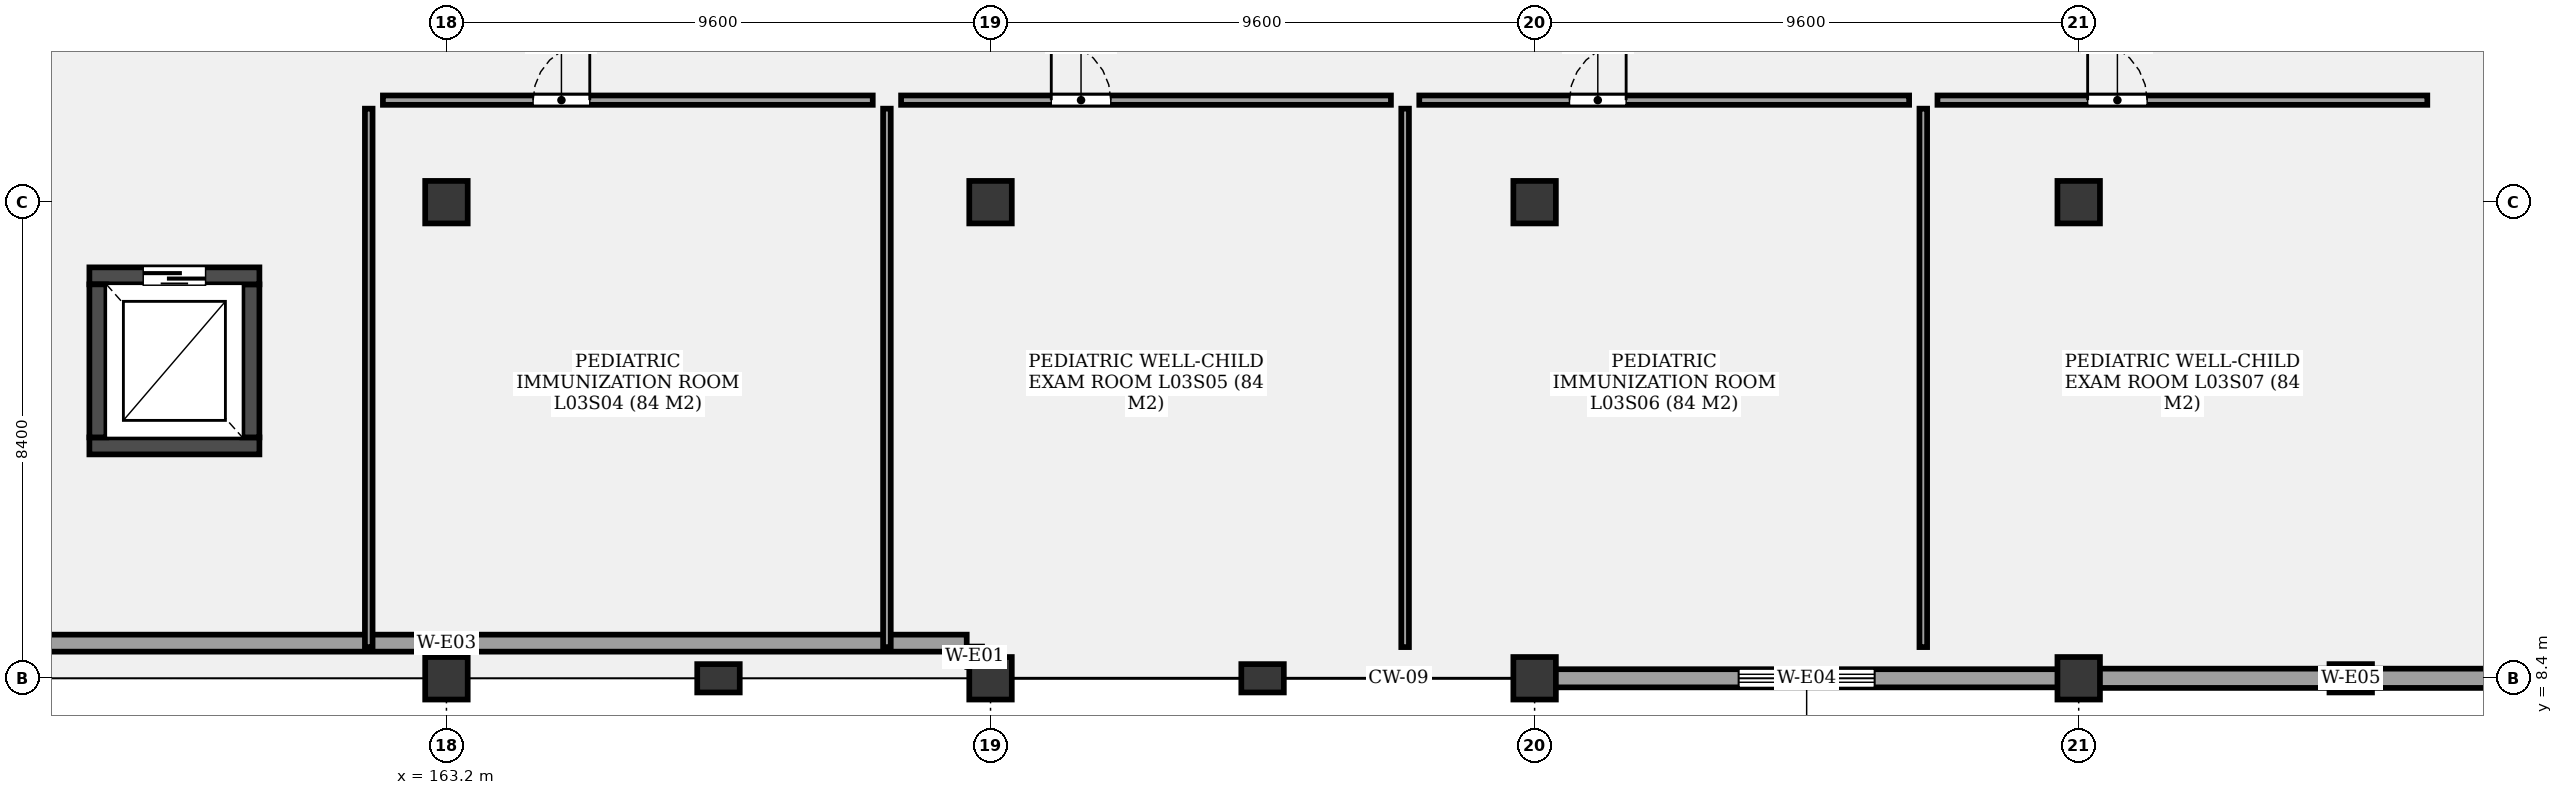
"""IFC4 building model, lengths in metres.
Left out: names, types, materials, properties, quantities, classifications, styles, units other than length and angle.
Written with IfcOpenShell. Run it as: python <this file> out.ifc"""

import sys

from ifc_helpers import new_model, si_unit, direction, frame, frame_2d, origin, origin_2d, place, context, subcontext, project, spatial, rectangle, extrude, element, fill, save


model = new_model("IFC4")
c1 = context("Model", 3, precision=1e-05, world=origin(), true_north=direction((0.0, 1.0)))
c2 = subcontext(c1, "Body", "Model", "MODEL_VIEW")
j1 = project(units=[si_unit("LENGTHUNIT", "METRE"), si_unit("PLANEANGLEUNIT", "RADIAN")], contexts=[c1])
p1 = place(None, origin())
s1 = spatial("IfcSite", under=j1, at=p1, CompositionType="ELEMENT")
p2 = place(p1, origin())
s2 = spatial("IfcBuilding", under=s1, at=p2, CompositionType="ELEMENT")
p3 = place(p2, frame((0.0, 0.0, 13.5)))
s3 = spatial("IfcBuildingStorey", under=s2, at=p3, CompositionType="ELEMENT", Elevation=13.5)
for number, where, z_axis, x_axis in (
    (1, (163.2, 8.4, 0.0), (0.0, 0.0, 1.0), (1.0, 0.0, 0.0)),
    (2, (163.2, 16.8, 0.0), (0.0, 0.0, 1.0), (1.0, 0.0, 0.0)),
    (3, (172.8, 8.4, 0.0), (0.0, 0.0, 1.0), (1.0, 0.0, 0.0)),
    (4, (172.8, 16.8, 0.0), (0.0, 0.0, 1.0), (1.0, 0.0, 0.0)),
    (5, (182.4, 8.4, 0.0), (0.0, 0.0, 1.0), (1.0, 0.0, 0.0)),
    (6, (182.4, 16.8, 0.0), (0.0, 0.0, 1.0), (1.0, 0.0, 0.0)),
    (7, (192.0, 8.4, 0.0), (0.0, 0.0, 1.0), (1.0, 0.0, 0.0)),
    (8, (192.0, 16.8, 0.0), (0.0, 0.0, 1.0), (1.0, 0.0, 0.0)),
):
    element("IfcColumn", number, at=place(p3, frame(where, z_axis=z_axis, x_axis=x_axis)), inside=s3, PredefinedType="COLUMN", context=c2, shape_type="SweptSolid", body=[
        extrude(rectangle(XDim=0.75, YDim=0.75, at=origin_2d()), origin(), (0.0, 0.0, 1.0), 4.3),
    ])
for number, where, z_axis, x_axis in (
    (9, (168.0, 8.4, 0.0), (0.0, 0.0, 1.0), (1.0, 0.0, 0.0)),
    (10, (177.6, 8.4, 0.0), (0.0, 0.0, 1.0), (1.0, 0.0, 0.0)),
    (11, (196.8, 8.4, 0.0), (0.0, 0.0, 1.0), (1.0, 0.0, 0.0)),
):
    element("IfcColumn", number, at=place(p3, frame(where, z_axis=z_axis, x_axis=x_axis)), inside=s3, PredefinedType="PILASTER", context=c2, shape_type="SweptSolid", body=[
        extrude(rectangle(XDim=0.75, YDim=0.5, at=origin_2d()), origin(), (0.0, 0.0, 1.0), 4.3),
    ])
p4 = place(p3, frame((156.9, 12.5, 0.0), z_axis=(0.0, 0.0, 1.0), x_axis=(1.0, 0.0, 0.0)))
e12 = element("IfcWall", 12, at=p4, inside=s3, PredefinedType="SHEAR", context=c2, shape_type="SweptSolid", body=[
    extrude(rectangle(XDim=3.0, YDim=0.3, at=frame_2d((1.5, 0.0))), origin(), (0.0, 0.0, 1.0), 4.3),
])
p5 = place(p3, frame((159.75, 12.65, 0.0), z_axis=(0.0, 0.0, 1.0), x_axis=(0.0, 1.0, 0.0)))
e13 = element("IfcWall", 13, at=p5, inside=s3, PredefinedType="SHEAR", context=c2, shape_type="SweptSolid", body=[
    extrude(rectangle(XDim=2.7, YDim=0.3, at=frame_2d((1.35, 0.0))), origin(), (0.0, 0.0, 1.0), 4.3),
])
p6 = place(p3, frame((159.9, 15.5, 0.0), z_axis=(0.0, 0.0, 1.0), x_axis=(-1.0, 0.0, 0.0)))
e14 = element("IfcWall", 14, at=p6, inside=s3, PredefinedType="SHEAR", context=c2, shape_type="SweptSolid", body=[
    extrude(rectangle(XDim=3.0, YDim=0.3, at=frame_2d((1.5, 0.0))), origin(), (0.0, 0.0, 1.0), 4.3),
])
p7 = place(p6, frame((0.95, 0.0, 0.0)))
e15 = element("IfcOpeningElement", 15, at=p7, cuts=e14, PredefinedType="OPENING", context=c2, shape_type="SweptSolid", body=[
    extrude(rectangle(XDim=1.1, YDim=2.2, at=frame_2d((0.55, 1.1))), frame((0.0, 0.16, 0.0), z_axis=(0.0, -1.0, 0.0), x_axis=(1.0, 0.0, 0.0)), (0.0, 0.0, 1.0), 0.32),
])
p8 = place(p3, frame((157.05, 15.35, 0.0), z_axis=(0.0, 0.0, 1.0), x_axis=(0.0, -1.0, 0.0)))
e16 = element("IfcWall", 16, at=p8, inside=s3, PredefinedType="SHEAR", context=c2, shape_type="SweptSolid", body=[
    extrude(rectangle(XDim=2.7, YDim=0.3, at=frame_2d((1.35, 0.0))), origin(), (0.0, 0.0, 1.0), 4.3),
])
p9 = place(p3, frame((172.52, 8.6, 0.0), z_axis=(0.0, 0.0, 1.0), x_axis=(0.0, 1.0, 0.0)))
e17 = element("IfcWall", 17, at=p9, inside=s3, PredefinedType="SOLIDWALL", context=c2, shape_type="SweptSolid", body=[
    extrude(rectangle(XDim=0.36, YDim=0.26, at=frame_2d((0.18, 0.0))), origin(), (0.0, 0.0, 1.0), 3.49),
])
p10 = place(p3, frame((172.38, 9.02, 0.0), z_axis=(0.0, 0.0, 1.0), x_axis=(-1.0, 0.0, 0.0)))
e18 = element("IfcWall", 18, at=p10, inside=s3, PredefinedType="SOLIDWALL", context=c2, shape_type="SweptSolid", body=[
    extrude(rectangle(XDim=18.36, YDim=0.3, at=frame_2d((9.18, 0.0))), origin(), (0.0, 0.0, 1.0), 3.49),
])
p11 = place(p3, frame((192.0, 8.4, 0.0), z_axis=(0.0, 0.0, 1.0), x_axis=(-1.0, 0.0, 0.0)))
e19 = element("IfcWall", 19, at=p11, inside=s3, PredefinedType="SOLIDWALL", context=c2, shape_type="SweptSolid", body=[
    extrude(rectangle(XDim=9.6, YDim=0.32, at=frame_2d((4.8, 0.0))), origin(), (0.0, 0.0, 1.0), 3.49),
])
p12 = place(p11, frame((3.6, 0.0, 0.85)))
e20 = element("IfcOpeningElement", 20, at=p12, cuts=e19, PredefinedType="OPENING", context=c2, shape_type="SweptSolid", body=[
    extrude(rectangle(XDim=2.4, YDim=1.4, at=frame_2d((1.2, 0.7))), frame((0.0, 0.17, 0.0), z_axis=(0.0, -1.0, 0.0), x_axis=(1.0, 0.0, 0.0)), (0.0, 0.0, 1.0), 0.34),
])
p13 = place(p3, frame((201.6, 8.4, 0.0), z_axis=(0.0, 0.0, 1.0), x_axis=(-1.0, 0.0, 0.0)))
e21 = element("IfcWall", 21, at=p13, inside=s3, PredefinedType="SOLIDWALL", context=c2, shape_type="SweptSolid", body=[
    extrude(rectangle(XDim=9.6, YDim=0.34, at=frame_2d((4.8, 0.0))), origin(), (0.0, 0.0, 1.0), 3.49),
])
p14 = place(p3, frame((162.079, 18.6, 0.0), z_axis=(0.0, 0.0, 1.0), x_axis=(1.0, 0.0, 0.0)))
e22 = element("IfcWall", 22, at=p14, inside=s3, PredefinedType="PARTITIONING", context=c2, shape_type="SweptSolid", body=[
    extrude(rectangle(XDim=8.643, YDim=0.165, at=frame_2d((4.321, 0.0))), origin(), (0.0, 0.0, 1.0), 3.4),
])
p15 = place(p14, frame((2.65, 0.0, 0.0)))
e23 = element("IfcOpeningElement", 23, at=p15, cuts=e22, PredefinedType="OPENING", context=c2, shape_type="SweptSolid", body=[
    extrude(rectangle(XDim=1.0, YDim=2.1, at=frame_2d((0.5, 1.05))), frame((0.0, 0.093, 0.0), z_axis=(0.0, -1.0, 0.0), x_axis=(1.0, 0.0, 0.0)), (0.0, 0.0, 1.0), 0.185),
])
p16 = place(p3, frame((161.829, 8.95, 0.0), z_axis=(0.0, 0.0, 1.0), x_axis=(0.0, 1.0, 0.0)))
e24 = element("IfcWall", 24, at=p16, inside=s3, PredefinedType="PARTITIONING", context=c2, shape_type="SweptSolid", body=[
    extrude(rectangle(XDim=9.5, YDim=0.135, at=frame_2d((4.75, 0.0))), origin(), (0.0, 0.0, 1.0), 3.4),
])
p17 = place(p3, frame((171.222, 18.6, 0.0), z_axis=(0.0, 0.0, 1.0), x_axis=(1.0, 0.0, 0.0)))
e25 = element("IfcWall", 25, at=p17, inside=s3, PredefinedType="PARTITIONING", context=c2, shape_type="SweptSolid", body=[
    extrude(rectangle(XDim=8.643, YDim=0.165, at=frame_2d((4.322, 0.0))), origin(), (0.0, 0.0, 1.0), 3.4),
])
p18 = place(p17, frame((2.65, 0.0, 0.0)))
e26 = element("IfcOpeningElement", 26, at=p18, cuts=e25, PredefinedType="OPENING", context=c2, shape_type="SweptSolid", body=[
    extrude(rectangle(XDim=1.05, YDim=2.1, at=frame_2d((0.525, 1.05))), frame((0.0, 0.093, 0.0), z_axis=(0.0, -1.0, 0.0), x_axis=(1.0, 0.0, 0.0)), (0.0, 0.0, 1.0), 0.185),
])
p19 = place(p3, frame((170.972, 8.95, 0.0), z_axis=(0.0, 0.0, 1.0), x_axis=(0.0, 1.0, 0.0)))
e27 = element("IfcWall", 27, at=p19, inside=s3, PredefinedType="PARTITIONING", context=c2, shape_type="SweptSolid", body=[
    extrude(rectangle(XDim=9.5, YDim=0.135, at=frame_2d((4.75, 0.0))), origin(), (0.0, 0.0, 1.0), 3.4),
])
p20 = place(p3, frame((180.365, 18.6, 0.0), z_axis=(0.0, 0.0, 1.0), x_axis=(1.0, 0.0, 0.0)))
e28 = element("IfcWall", 28, at=p20, inside=s3, PredefinedType="PARTITIONING", context=c2, shape_type="SweptSolid", body=[
    extrude(rectangle(XDim=8.643, YDim=0.165, at=frame_2d((4.322, 0.0))), origin(), (0.0, 0.0, 1.0), 3.4),
])
p21 = place(p20, frame((2.65, 0.0, 0.0)))
e29 = element("IfcOpeningElement", 29, at=p21, cuts=e28, PredefinedType="OPENING", context=c2, shape_type="SweptSolid", body=[
    extrude(rectangle(XDim=1.0, YDim=2.1, at=frame_2d((0.5, 1.05))), frame((0.0, 0.093, 0.0), z_axis=(0.0, -1.0, 0.0), x_axis=(1.0, 0.0, 0.0)), (0.0, 0.0, 1.0), 0.185),
])
p22 = place(p3, frame((180.115, 8.95, 0.0), z_axis=(0.0, 0.0, 1.0), x_axis=(0.0, 1.0, 0.0)))
e30 = element("IfcWall", 30, at=p22, inside=s3, PredefinedType="PARTITIONING", context=c2, shape_type="SweptSolid", body=[
    extrude(rectangle(XDim=9.5, YDim=0.135, at=frame_2d((4.75, 0.0))), origin(), (0.0, 0.0, 1.0), 3.4),
])
p23 = place(p3, frame((189.508, 18.6, 0.0), z_axis=(0.0, 0.0, 1.0), x_axis=(1.0, 0.0, 0.0)))
e31 = element("IfcWall", 31, at=p23, inside=s3, PredefinedType="PARTITIONING", context=c2, shape_type="SweptSolid", body=[
    extrude(rectangle(XDim=8.643, YDim=0.165, at=frame_2d((4.321, 0.0))), origin(), (0.0, 0.0, 1.0), 3.4),
])
p24 = place(p23, frame((2.65, 0.0, 0.0)))
e32 = element("IfcOpeningElement", 32, at=p24, cuts=e31, PredefinedType="OPENING", context=c2, shape_type="SweptSolid", body=[
    extrude(rectangle(XDim=1.05, YDim=2.1, at=frame_2d((0.525, 1.05))), frame((0.0, 0.093, 0.0), z_axis=(0.0, -1.0, 0.0), x_axis=(1.0, 0.0, 0.0)), (0.0, 0.0, 1.0), 0.185),
])
p25 = place(p3, frame((189.258, 8.95, 0.0), z_axis=(0.0, 0.0, 1.0), x_axis=(0.0, 1.0, 0.0)))
e33 = element("IfcWall", 33, at=p25, inside=s3, PredefinedType="PARTITIONING", context=c2, shape_type="SweptSolid", body=[
    extrude(rectangle(XDim=9.5, YDim=0.135, at=frame_2d((4.75, 0.0))), origin(), (0.0, 0.0, 1.0), 3.4),
])
p26 = place(p7, origin())
e34 = element("IfcDoor", 34, at=p26, inside=s3, OperationType="SLIDING_TO_LEFT", PredefinedType="DOOR", context=c2, shape_type="SweptSolid", body=[
    extrude(rectangle(XDim=1.1, YDim=2.2, at=frame_2d((0.55, 1.1))), frame((0.0, 0.025, 0.0), z_axis=(0.0, -1.0, 0.0), x_axis=(1.0, 0.0, 0.0)), (0.0, 0.0, 1.0), 0.05),
])
fill(e15, e34)
p27 = place(p12, origin())
e35 = element("IfcWindow", 35, at=p27, inside=s3, PartitioningType="SINGLE_PANEL", PredefinedType="WINDOW", context=c2, shape_type="SweptSolid", body=[
    extrude(rectangle(XDim=2.4, YDim=1.4, at=frame_2d((1.2, 0.7))), frame((0.0, 0.03, 0.0), z_axis=(0.0, -1.0, 0.0), x_axis=(1.0, 0.0, 0.0)), (0.0, 0.0, 1.0), 0.06),
])
fill(e20, e35)
p28 = place(p15, origin())
e36 = element("IfcDoor", 36, at=p28, inside=s3, OperationType="SINGLE_SWING_RIGHT", PredefinedType="DOOR", context=c2, shape_type="SweptSolid", body=[
    extrude(rectangle(XDim=1.0, YDim=2.1, at=frame_2d((0.5, 1.05))), frame((0.0, 0.025, 0.0), z_axis=(0.0, -1.0, 0.0), x_axis=(1.0, 0.0, 0.0)), (0.0, 0.0, 1.0), 0.05),
])
fill(e23, e36)
p29 = place(p18, origin())
e37 = element("IfcDoor", 37, at=p29, inside=s3, OperationType="SINGLE_SWING_LEFT", PredefinedType="DOOR", context=c2, shape_type="SweptSolid", body=[
    extrude(rectangle(XDim=1.05, YDim=2.1, at=frame_2d((0.525, 1.05))), frame((0.0, 0.025, 0.0), z_axis=(0.0, -1.0, 0.0), x_axis=(1.0, 0.0, 0.0)), (0.0, 0.0, 1.0), 0.05),
])
fill(e26, e37)
p30 = place(p21, origin())
e38 = element("IfcDoor", 38, at=p30, inside=s3, OperationType="SINGLE_SWING_RIGHT", PredefinedType="DOOR", context=c2, shape_type="SweptSolid", body=[
    extrude(rectangle(XDim=1.0, YDim=2.1, at=frame_2d((0.5, 1.05))), frame((0.0, 0.025, 0.0), z_axis=(0.0, -1.0, 0.0), x_axis=(1.0, 0.0, 0.0)), (0.0, 0.0, 1.0), 0.05),
])
fill(e29, e38)
p31 = place(p24, origin())
e39 = element("IfcDoor", 39, at=p31, inside=s3, OperationType="SINGLE_SWING_LEFT", PredefinedType="DOOR", context=c2, shape_type="SweptSolid", body=[
    extrude(rectangle(XDim=1.05, YDim=2.1, at=frame_2d((0.525, 1.05))), frame((0.0, 0.025, 0.0), z_axis=(0.0, -1.0, 0.0), x_axis=(1.0, 0.0, 0.0)), (0.0, 0.0, 1.0), 0.05),
])
fill(e32, e39)
save(model, sys.argv[1])
